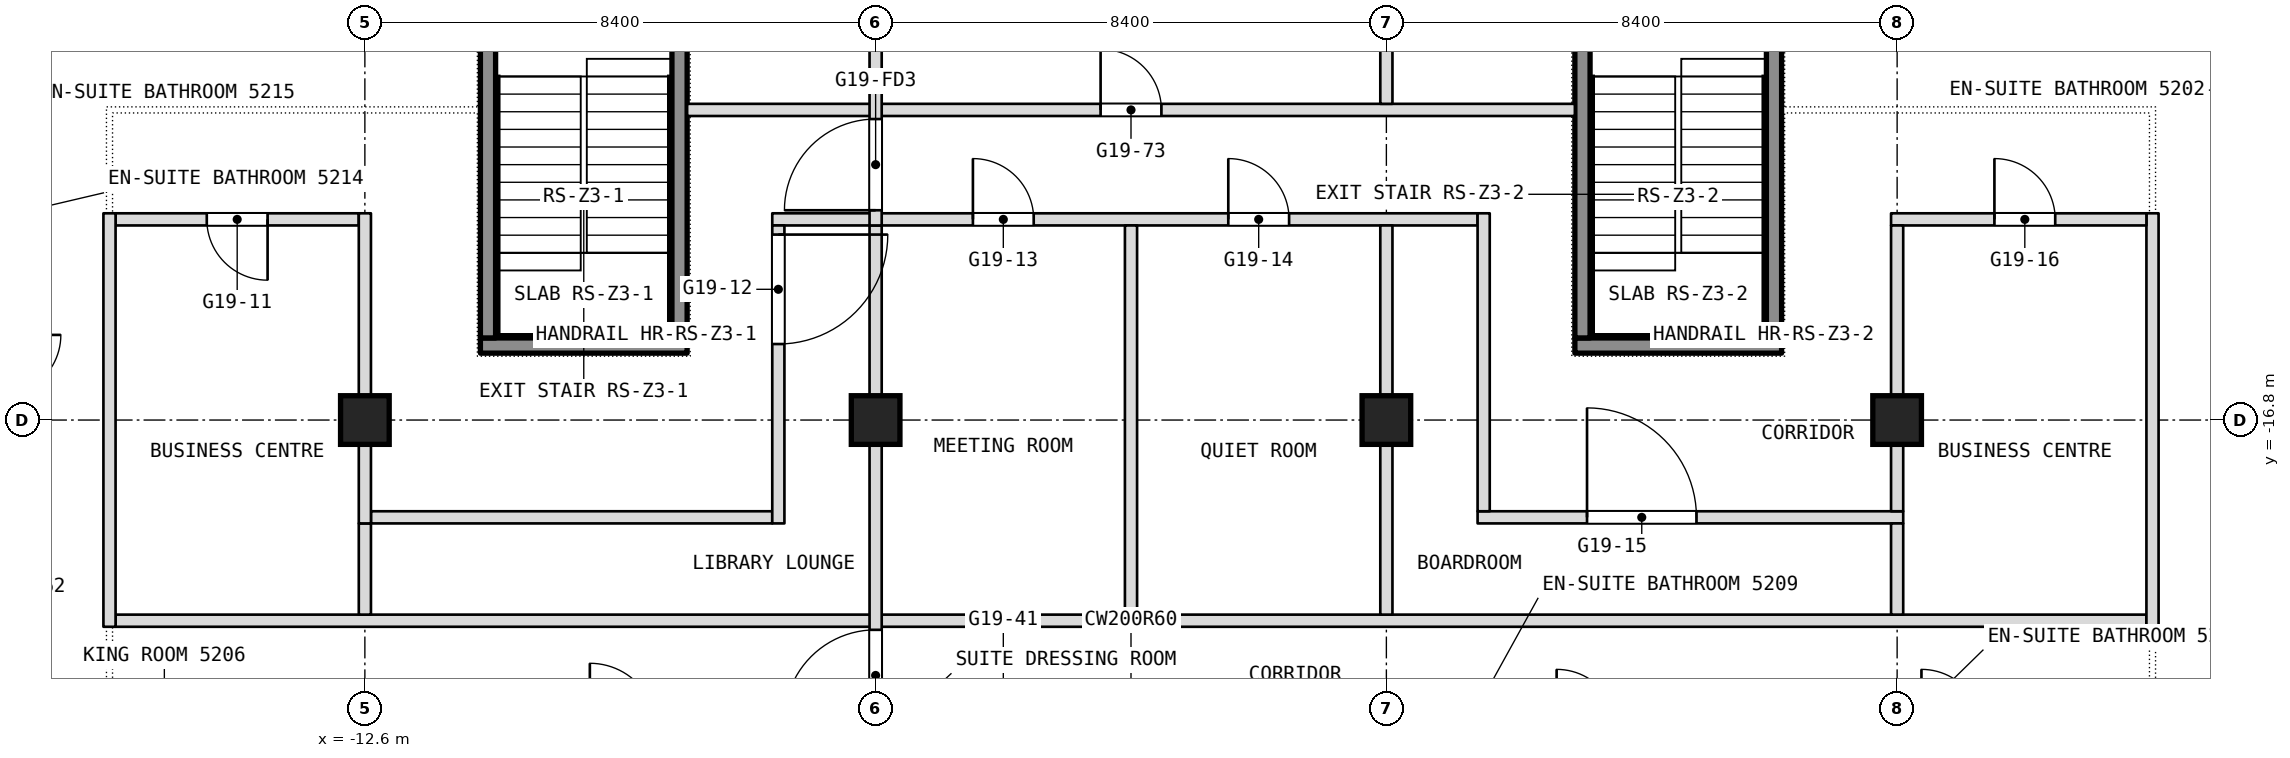
"""IFC4 building model, lengths in metres.
Left out: names, types, materials, properties, quantities, classifications, styles, units other than length and angle.
Written with IfcOpenShell. Run it as: python <this file> out.ifc"""

import sys

from ifc_helpers import new_model, si_unit, direction, frame, frame_2d, origin, origin_2d, place, context, subcontext, project, spatial, rectangle, extrude, element, fill, save


model = new_model("IFC4")
c1 = context("Model", 3, precision=1e-05, world=origin(), true_north=direction((0.0, 1.0)))
c2 = subcontext(c1, "Body", "Model", "MODEL_VIEW")
j1 = project(units=[si_unit("LENGTHUNIT", "METRE"), si_unit("PLANEANGLEUNIT", "RADIAN")], contexts=[c1])
p1 = place(None, origin())
s1 = spatial("IfcSite", under=j1, at=p1, CompositionType="ELEMENT")
p2 = place(p1, origin())
s2 = spatial("IfcBuilding", under=s1, at=p2, CompositionType="ELEMENT")
p3 = place(p2, frame((0.0, 0.0, 223.7)))
s3 = spatial("IfcBuildingStorey", under=s2, at=p3, CompositionType="ELEMENT", Elevation=223.7)
for number, where, z_axis, x_axis in (
    (1, (-12.6, -16.8, 0.0), (0.0, 0.0, 1.0), (1.0, 0.0, 0.0)),
    (2, (-4.2, -16.8, 0.0), (0.0, 0.0, 1.0), (1.0, 0.0, 0.0)),
    (3, (4.2, -16.8, 0.0), (0.0, 0.0, 1.0), (1.0, 0.0, 0.0)),
    (4, (12.6, -16.8, 0.0), (0.0, 0.0, 1.0), (1.0, 0.0, 0.0)),
):
    element("IfcColumn", number, at=place(p3, frame(where, z_axis=z_axis, x_axis=x_axis)), inside=s3, PredefinedType="COLUMN", context=c2, shape_type="SweptSolid", body=[
        extrude(rectangle(XDim=0.8, YDim=0.8, at=origin_2d()), origin(), (0.0, 0.0, 1.0), 3.6),
    ])
p4 = place(p3, frame((-16.7, -20.1, 0.0), z_axis=(0.0, 0.0, 1.0), x_axis=(1.0, 0.0, 0.0)))
e5 = element("IfcWall", 5, at=p4, inside=s3, PredefinedType="PARTITIONING", context=c2, shape_type="SweptSolid", body=[
    extrude(rectangle(XDim=33.4, YDim=0.2, at=frame_2d((16.7, 0.0))), origin(), (0.0, 0.0, 1.0), 3.34),
])
p5 = place(p3, frame((-12.5, -18.4, 0.0), z_axis=(0.0, 0.0, 1.0), x_axis=(1.0, 0.0, 0.0)))
e6 = element("IfcWall", 6, at=p5, inside=s3, PredefinedType="PARTITIONING", context=c2, shape_type="SweptSolid", body=[
    extrude(rectangle(XDim=6.6, YDim=0.2, at=frame_2d((3.3, 0.0))), origin(), (0.0, 0.0, 1.0), 3.34),
])
p6 = place(p3, frame((5.7, -18.4, 0.0), z_axis=(0.0, 0.0, 1.0), x_axis=(1.0, 0.0, 0.0)))
e7 = element("IfcWall", 7, at=p6, inside=s3, PredefinedType="PARTITIONING", context=c2, shape_type="SweptSolid", body=[
    extrude(rectangle(XDim=7.0, YDim=0.2, at=frame_2d((3.5, 0.0))), origin(), (0.0, 0.0, 1.0), 3.34),
])
p7 = place(p6, frame((1.8, 0.0, 0.0)))
e8 = element("IfcOpeningElement", 8, at=p7, cuts=e7, PredefinedType="OPENING", context=c2, shape_type="SweptSolid", body=[
    extrude(rectangle(XDim=1.8, YDim=2.1, at=frame_2d((0.9, 1.05))), frame((0.0, 0.1, 0.0), z_axis=(0.0, -1.0, 0.0), x_axis=(1.0, 0.0, 0.0)), (0.0, 0.0, 1.0), 0.2),
])
p8 = place(p3, frame((16.8, -20.2, 0.0), z_axis=(0.0, 0.0, 1.0), x_axis=(0.0, 1.0, 0.0)))
e9 = element("IfcWall", 9, at=p8, inside=s3, PredefinedType="PARTITIONING", context=c2, shape_type="SweptSolid", body=[
    extrude(rectangle(XDim=6.8, YDim=0.2, at=frame_2d((3.4, 0.0))), origin(), (0.0, 0.0, 1.0), 3.34),
])
p9 = place(p3, frame((-16.7, -13.5, 0.0), z_axis=(0.0, 0.0, 1.0), x_axis=(1.0, 0.0, 0.0)))
e10 = element("IfcWall", 10, at=p9, inside=s3, PredefinedType="PARTITIONING", context=c2, shape_type="SweptSolid", body=[
    extrude(rectangle(XDim=4.0, YDim=0.2, at=frame_2d((2.0, 0.0))), origin(), (0.0, 0.0, 1.0), 3.34),
])
p10 = place(p9, frame((1.5, 0.0, 0.0)))
e11 = element("IfcOpeningElement", 11, at=p10, cuts=e10, PredefinedType="OPENING", context=c2, shape_type="SweptSolid", body=[
    extrude(rectangle(XDim=1.0, YDim=2.1, at=frame_2d((0.5, 1.05))), frame((0.0, 0.1, 0.0), z_axis=(0.0, -1.0, 0.0), x_axis=(1.0, 0.0, 0.0)), (0.0, 0.0, 1.0), 0.2),
])
p11 = place(p3, frame((-5.9, -13.5, 0.0), z_axis=(0.0, 0.0, 1.0), x_axis=(1.0, 0.0, 0.0)))
e12 = element("IfcWall", 12, at=p11, inside=s3, PredefinedType="PARTITIONING", context=c2, shape_type="SweptSolid", body=[
    extrude(rectangle(XDim=11.6, YDim=0.2, at=frame_2d((5.8, 0.0))), origin(), (0.0, 0.0, 1.0), 3.34),
])
p12 = place(p11, frame((3.3, 0.0, 0.0)))
e13 = element("IfcOpeningElement", 13, at=p12, cuts=e12, PredefinedType="OPENING", context=c2, shape_type="SweptSolid", body=[
    extrude(rectangle(XDim=1.0, YDim=2.1, at=frame_2d((0.5, 1.05))), frame((0.0, 0.1, 0.0), z_axis=(0.0, -1.0, 0.0), x_axis=(1.0, 0.0, 0.0)), (0.0, 0.0, 1.0), 0.2),
])
p13 = place(p11, frame((7.5, 0.0, 0.0)))
e14 = element("IfcOpeningElement", 14, at=p13, cuts=e12, PredefinedType="OPENING", context=c2, shape_type="SweptSolid", body=[
    extrude(rectangle(XDim=1.0, YDim=2.1, at=frame_2d((0.5, 1.05))), frame((0.0, 0.1, 0.0), z_axis=(0.0, -1.0, 0.0), x_axis=(1.0, 0.0, 0.0)), (0.0, 0.0, 1.0), 0.2),
])
p14 = place(p3, frame((12.5, -13.5, 0.0), z_axis=(0.0, 0.0, 1.0), x_axis=(1.0, 0.0, 0.0)))
e15 = element("IfcWall", 15, at=p14, inside=s3, PredefinedType="PARTITIONING", context=c2, shape_type="SweptSolid", body=[
    extrude(rectangle(XDim=4.2, YDim=0.2, at=frame_2d((2.1, 0.0))), origin(), (0.0, 0.0, 1.0), 3.34),
])
p15 = place(p14, frame((1.7, 0.0, 0.0)))
e16 = element("IfcOpeningElement", 16, at=p15, cuts=e15, PredefinedType="OPENING", context=c2, shape_type="SweptSolid", body=[
    extrude(rectangle(XDim=1.0, YDim=2.1, at=frame_2d((0.5, 1.05))), frame((0.0, 0.1, 0.0), z_axis=(0.0, -1.0, 0.0), x_axis=(1.0, 0.0, 0.0)), (0.0, 0.0, 1.0), 0.2),
])
p16 = place(p3, frame((12.6, -20.0, 0.0), z_axis=(0.0, 0.0, 1.0), x_axis=(0.0, 1.0, 0.0)))
e17 = element("IfcWall", 17, at=p16, inside=s3, PredefinedType="PARTITIONING", context=c2, shape_type="SweptSolid", body=[
    extrude(rectangle(XDim=1.5, YDim=0.2, at=frame_2d((0.75, 0.0))), origin(), (0.0, 0.0, 1.0), 3.34),
])
p17 = place(p3, frame((12.6, -18.3, 0.0), z_axis=(0.0, 0.0, 1.0), x_axis=(0.0, 1.0, 0.0)))
e18 = element("IfcWall", 18, at=p17, inside=s3, PredefinedType="PARTITIONING", context=c2, shape_type="SweptSolid", body=[
    extrude(rectangle(XDim=4.7, YDim=0.2, at=frame_2d((2.35, 0.0))), origin(), (0.0, 0.0, 1.0), 3.34),
])
p18 = place(p3, frame((-7.3, -11.7, 0.0), z_axis=(0.0, 0.0, 1.0), x_axis=(1.0, 0.0, 0.0)))
e19 = element("IfcWall", 19, at=p18, inside=s3, PredefinedType="PARTITIONING", context=c2, shape_type="SweptSolid", body=[
    extrude(rectangle(XDim=14.6, YDim=0.2, at=frame_2d((7.3, 0.0))), origin(), (0.0, 0.0, 1.0), 3.34),
])
p19 = place(p18, frame((6.8, 0.0, 0.0)))
e20 = element("IfcOpeningElement", 20, at=p19, cuts=e19, PredefinedType="OPENING", context=c2, shape_type="SweptSolid", body=[
    extrude(rectangle(XDim=1.0, YDim=2.1, at=frame_2d((0.5, 1.05))), frame((0.0, 0.1, 0.0), z_axis=(0.0, -1.0, 0.0), x_axis=(1.0, 0.0, 0.0)), (0.0, 0.0, 1.0), 0.2),
])
p20 = place(p3, frame((5.8, -18.3, 0.0), z_axis=(0.0, 0.0, 1.0), x_axis=(0.0, 1.0, 0.0)))
e21 = element("IfcWall", 21, at=p20, inside=s3, PredefinedType="PARTITIONING", context=c2, shape_type="SweptSolid", body=[
    extrude(rectangle(XDim=4.9, YDim=0.2, at=frame_2d((2.45, 0.0))), origin(), (0.0, 0.0, 1.0), 3.34),
])
p21 = place(p3, frame((4.2, -20.0, 0.0), z_axis=(0.0, 0.0, 1.0), x_axis=(0.0, 1.0, 0.0)))
e22 = element("IfcWall", 22, at=p21, inside=s3, PredefinedType="PARTITIONING", context=c2, shape_type="SweptSolid", body=[
    extrude(rectangle(XDim=6.4, YDim=0.2, at=frame_2d((3.2, 0.0))), origin(), (0.0, 0.0, 1.0), 3.34),
])
p22 = place(p3, frame((4.2, -11.6, 0.0), z_axis=(0.0, 0.0, 1.0), x_axis=(0.0, 1.0, 0.0)))
e23 = element("IfcWall", 23, at=p22, inside=s3, PredefinedType="PARTITIONING", context=c2, shape_type="SweptSolid", body=[
    extrude(rectangle(XDim=9.7, YDim=0.2, at=frame_2d((4.85, 0.0))), origin(), (0.0, 0.0, 1.0), 3.34),
])
p23 = place(p3, frame((0.0, -20.0, 0.0), z_axis=(0.0, 0.0, 1.0), x_axis=(0.0, 1.0, 0.0)))
e24 = element("IfcWall", 24, at=p23, inside=s3, PredefinedType="PARTITIONING", context=c2, shape_type="SweptSolid", body=[
    extrude(rectangle(XDim=6.4, YDim=0.2, at=frame_2d((3.2, 0.0))), origin(), (0.0, 0.0, 1.0), 3.34),
])
p24 = place(p3, frame((-4.2, -22.0, 0.0), z_axis=(0.0, 0.0, 1.0), x_axis=(0.0, 1.0, 0.0)))
e25 = element("IfcWall", 25, at=p24, inside=s3, PredefinedType="PARTITIONING", context=c2, shape_type="SweptSolid", body=[
    extrude(rectangle(XDim=8.4, YDim=0.2, at=frame_2d((4.2, 0.0))), origin(), (0.0, 0.0, 1.0), 3.34),
])
p25 = place(p24, frame((0.25, 0.0, 0.0)))
e26 = element("IfcOpeningElement", 26, at=p25, cuts=e25, PredefinedType="OPENING", context=c2, shape_type="SweptSolid", body=[
    extrude(rectangle(XDim=1.5, YDim=2.1, at=frame_2d((0.75, 1.05))), frame((0.0, 0.1, 0.0), z_axis=(0.0, -1.0, 0.0), x_axis=(1.0, 0.0, 0.0)), (0.0, 0.0, 1.0), 0.2),
])
p26 = place(p3, frame((-4.2, -13.6, 0.0), z_axis=(0.0, 0.0, 1.0), x_axis=(0.0, 1.0, 0.0)))
e27 = element("IfcWall", 27, at=p26, inside=s3, PredefinedType="PARTITIONING", context=c2, shape_type="SweptSolid", body=[
    extrude(rectangle(XDim=13.6, YDim=0.2, at=frame_2d((6.8, 0.0))), origin(), (0.0, 0.0, 1.0), 3.34),
])
p27 = place(p26, frame((11.95, 0.0, 0.0)))
e28 = element("IfcOpeningElement", 28, at=p27, cuts=e27, PredefinedType="OPENING", context=c2, shape_type="SweptSolid", body=[
    extrude(rectangle(XDim=1.5, YDim=2.1, at=frame_2d((0.75, 1.05))), frame((0.0, 0.1, 0.0), z_axis=(0.0, -1.0, 0.0), x_axis=(1.0, 0.0, 0.0)), (0.0, 0.0, 1.0), 0.2),
])
p28 = place(p26, frame((0.25, 0.0, 0.0)))
e29 = element("IfcOpeningElement", 29, at=p28, cuts=e27, PredefinedType="OPENING", context=c2, shape_type="SweptSolid", body=[
    extrude(rectangle(XDim=1.5, YDim=2.1, at=frame_2d((0.75, 1.05))), frame((0.0, 0.1, 0.0), z_axis=(0.0, -1.0, 0.0), x_axis=(1.0, 0.0, 0.0)), (0.0, 0.0, 1.0), 0.2),
])
p29 = place(p3, frame((-5.8, -18.5, 0.0), z_axis=(0.0, 0.0, 1.0), x_axis=(0.0, 1.0, 0.0)))
e30 = element("IfcWall", 30, at=p29, inside=s3, PredefinedType="PARTITIONING", context=c2, shape_type="SweptSolid", body=[
    extrude(rectangle(XDim=4.9, YDim=0.2, at=frame_2d((2.45, 0.0))), origin(), (0.0, 0.0, 1.0), 3.34),
])
p30 = place(p29, frame((2.95, 0.0, 0.0)))
e31 = element("IfcOpeningElement", 31, at=p30, cuts=e30, PredefinedType="OPENING", context=c2, shape_type="SweptSolid", body=[
    extrude(rectangle(XDim=1.8, YDim=2.1, at=frame_2d((0.9, 1.05))), frame((0.0, 0.1, 0.0), z_axis=(0.0, -1.0, 0.0), x_axis=(1.0, 0.0, 0.0)), (0.0, 0.0, 1.0), 0.2),
])
p31 = place(p3, frame((-12.6, -20.0, 0.0), z_axis=(0.0, 0.0, 1.0), x_axis=(0.0, 1.0, 0.0)))
e32 = element("IfcWall", 32, at=p31, inside=s3, PredefinedType="PARTITIONING", context=c2, shape_type="SweptSolid", body=[
    extrude(rectangle(XDim=1.5, YDim=0.2, at=frame_2d((0.75, 0.0))), origin(), (0.0, 0.0, 1.0), 3.34),
])
p32 = place(p3, frame((-12.6, -18.5, 0.0), z_axis=(0.0, 0.0, 1.0), x_axis=(0.0, 1.0, 0.0)))
e33 = element("IfcWall", 33, at=p32, inside=s3, PredefinedType="PARTITIONING", context=c2, shape_type="SweptSolid", body=[
    extrude(rectangle(XDim=5.1, YDim=0.2, at=frame_2d((2.55, 0.0))), origin(), (0.0, 0.0, 1.0), 3.34),
])
p33 = place(p3, frame((-16.8, -20.2, 0.0), z_axis=(0.0, 0.0, 1.0), x_axis=(0.0, 1.0, 0.0)))
e34 = element("IfcWall", 34, at=p33, inside=s3, PredefinedType="PARTITIONING", context=c2, shape_type="SweptSolid", body=[
    extrude(rectangle(XDim=6.8, YDim=0.2, at=frame_2d((3.4, 0.0))), origin(), (0.0, 0.0, 1.0), 3.34),
])
p34 = place(p3, frame((-10.7, -15.575, 0.1), z_axis=(0.0, 0.0, 1.0), x_axis=(1.0, 0.0, 0.0)))
e35 = element("IfcWall", 35, at=p34, inside=s3, PredefinedType="SHEAR", context=c2, shape_type="SweptSolid", body=[
    extrude(rectangle(XDim=3.4, YDim=0.25, at=frame_2d((1.7, 0.0))), origin(), (0.0, 0.0, 1.0), 3.6),
])
for number, where, z_axis, x_axis in (
    (36, (-10.575, -15.45, 0.1), (0.0, 0.0, 1.0), (0.0, 1.0, 0.0)),
    (37, (-7.425, -15.45, 0.1), (0.0, 0.0, 1.0), (0.0, 1.0, 0.0)),
):
    element("IfcWall", number, at=place(p3, frame(where, z_axis=z_axis, x_axis=x_axis)), inside=s3, PredefinedType="SHEAR", context=c2, shape_type="SweptSolid", body=[
        extrude(rectangle(XDim=5.7, YDim=0.25, at=frame_2d((2.85, 0.0))), origin(), (0.0, 0.0, 1.0), 3.6),
    ])
p35 = place(p3, frame((7.3, -15.575, 0.1), z_axis=(0.0, 0.0, 1.0), x_axis=(1.0, 0.0, 0.0)))
e38 = element("IfcWall", 38, at=p35, inside=s3, PredefinedType="SHEAR", context=c2, shape_type="SweptSolid", body=[
    extrude(rectangle(XDim=3.4, YDim=0.25, at=frame_2d((1.7, 0.0))), origin(), (0.0, 0.0, 1.0), 3.6),
])
for number, where, z_axis, x_axis in (
    (39, (7.425, -15.45, 0.1), (0.0, 0.0, 1.0), (0.0, 1.0, 0.0)),
    (40, (10.575, -15.45, 0.1), (0.0, 0.0, 1.0), (0.0, 1.0, 0.0)),
):
    element("IfcWall", number, at=place(p3, frame(where, z_axis=z_axis, x_axis=x_axis)), inside=s3, PredefinedType="SHEAR", context=c2, shape_type="SweptSolid", body=[
        extrude(rectangle(XDim=5.7, YDim=0.25, at=frame_2d((2.85, 0.0))), origin(), (0.0, 0.0, 1.0), 3.6),
    ])
p36 = place(p7, origin())
e41 = element("IfcDoor", 41, at=p36, inside=s3, OperationType="DOUBLE_DOOR_SINGLE_SWING", PredefinedType="DOOR", context=c2, shape_type="SweptSolid", body=[
    extrude(rectangle(XDim=1.8, YDim=2.1, at=frame_2d((0.9, 1.05))), frame((0.0, 0.025, 0.0), z_axis=(0.0, -1.0, 0.0), x_axis=(1.0, 0.0, 0.0)), (0.0, 0.0, 1.0), 0.05),
])
fill(e8, e41)
p37 = place(p10, origin())
e42 = element("IfcDoor", 42, at=p37, inside=s3, OperationType="SINGLE_SWING_LEFT", PredefinedType="DOOR", context=c2, shape_type="SweptSolid", body=[
    extrude(rectangle(XDim=1.0, YDim=2.1, at=frame_2d((0.5, 1.05))), frame((0.0, 0.025, 0.0), z_axis=(0.0, -1.0, 0.0), x_axis=(1.0, 0.0, 0.0)), (0.0, 0.0, 1.0), 0.05),
])
fill(e11, e42)
p38 = place(p12, origin())
e43 = element("IfcDoor", 43, at=p38, inside=s3, OperationType="SINGLE_SWING_LEFT", PredefinedType="DOOR", context=c2, shape_type="SweptSolid", body=[
    extrude(rectangle(XDim=1.0, YDim=2.1, at=frame_2d((0.5, 1.05))), frame((0.0, 0.025, 0.0), z_axis=(0.0, -1.0, 0.0), x_axis=(1.0, 0.0, 0.0)), (0.0, 0.0, 1.0), 0.05),
])
fill(e13, e43)
p39 = place(p13, origin())
e44 = element("IfcDoor", 44, at=p39, inside=s3, OperationType="SINGLE_SWING_RIGHT", PredefinedType="DOOR", context=c2, shape_type="SweptSolid", body=[
    extrude(rectangle(XDim=1.0, YDim=2.1, at=frame_2d((0.5, 1.05))), frame((0.0, 0.025, 0.0), z_axis=(0.0, -1.0, 0.0), x_axis=(1.0, 0.0, 0.0)), (0.0, 0.0, 1.0), 0.05),
])
fill(e14, e44)
p40 = place(p15, origin())
e45 = element("IfcDoor", 45, at=p40, inside=s3, OperationType="SINGLE_SWING_RIGHT", PredefinedType="DOOR", context=c2, shape_type="SweptSolid", body=[
    extrude(rectangle(XDim=1.0, YDim=2.1, at=frame_2d((0.5, 1.05))), frame((0.0, 0.025, 0.0), z_axis=(0.0, -1.0, 0.0), x_axis=(1.0, 0.0, 0.0)), (0.0, 0.0, 1.0), 0.05),
])
fill(e16, e45)
p41 = place(p19, origin())
e46 = element("IfcDoor", 46, at=p41, inside=s3, OperationType="SINGLE_SWING_LEFT", PredefinedType="DOOR", context=c2, shape_type="SweptSolid", body=[
    extrude(rectangle(XDim=1.0, YDim=2.1, at=frame_2d((0.5, 1.05))), frame((0.0, 0.025, 0.0), z_axis=(0.0, -1.0, 0.0), x_axis=(1.0, 0.0, 0.0)), (0.0, 0.0, 1.0), 0.05),
])
fill(e20, e46)
p42 = place(p30, origin())
e47 = element("IfcDoor", 47, at=p42, inside=s3, OperationType="DOUBLE_DOOR_SINGLE_SWING", PredefinedType="DOOR", context=c2, shape_type="SweptSolid", body=[
    extrude(rectangle(XDim=1.8, YDim=2.1, at=frame_2d((0.9, 1.05))), frame((0.0, 0.025, 0.0), z_axis=(0.0, -1.0, 0.0), x_axis=(1.0, 0.0, 0.0)), (0.0, 0.0, 1.0), 0.05),
])
fill(e31, e47)
p43 = place(p28, origin())
e48 = element("IfcDoor", 48, at=p43, inside=s3, OperationType="DOUBLE_DOOR_DOUBLE_SWING", PredefinedType="DOOR", context=c2, shape_type="SweptSolid", body=[
    extrude(rectangle(XDim=1.5, YDim=2.1, at=frame_2d((0.75, 1.05))), frame((0.0, 0.025, 0.0), z_axis=(0.0, -1.0, 0.0), x_axis=(1.0, 0.0, 0.0)), (0.0, 0.0, 1.0), 0.05),
])
fill(e29, e48)
p44 = place(p25, origin())
e49 = element("IfcDoor", 49, at=p44, inside=s3, OperationType="DOUBLE_DOOR_DOUBLE_SWING", PredefinedType="DOOR", context=c2, shape_type="SweptSolid", body=[
    extrude(rectangle(XDim=1.5, YDim=2.1, at=frame_2d((0.75, 1.05))), frame((0.0, 0.025, 0.0), z_axis=(0.0, -1.0, 0.0), x_axis=(1.0, 0.0, 0.0)), (0.0, 0.0, 1.0), 0.05),
])
fill(e26, e49)
save(model, sys.argv[1])
